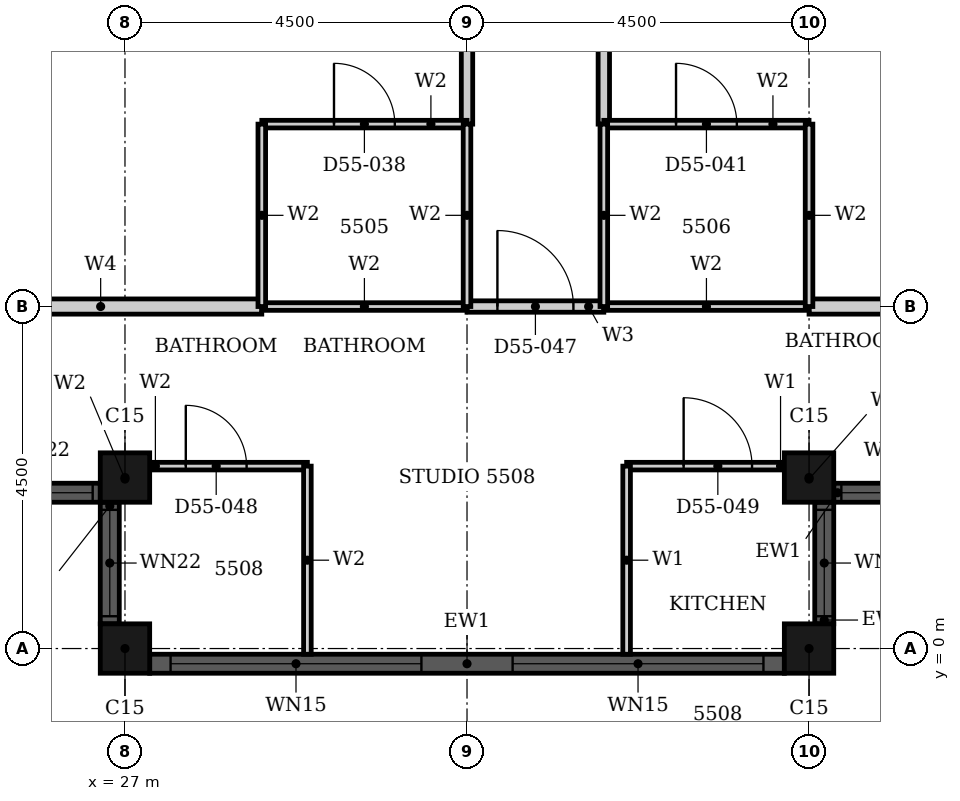
"""IFC4 building model, lengths in metres.
Left out: names, types, materials, properties, quantities, classifications, styles, units other than length and angle.
Written with IfcOpenShell. Run it as: python <this file> out.ifc"""

import sys

from ifc_helpers import new_model, si_unit, direction, frame, frame_2d, origin, origin_2d, place, context, subcontext, project, spatial, rectangle, hollow_rectangle, extrude, element, fill, save


model = new_model("IFC4")
c1 = context("Model", 3, precision=1e-05, world=origin(), true_north=direction((0.0, 1.0)))
c2 = subcontext(c1, "Body", "Model", "MODEL_VIEW")
j1 = project(units=[si_unit("LENGTHUNIT", "METRE"), si_unit("PLANEANGLEUNIT", "RADIAN")], contexts=[c1])
p1 = place(None, origin())
s1 = spatial("IfcSite", under=j1, at=p1, CompositionType="ELEMENT")
p2 = place(p1, origin())
s2 = spatial("IfcBuilding", under=s1, at=p2, CompositionType="ELEMENT")
p3 = place(p2, frame((0.0, 0.0, 218.3)))
s3 = spatial("IfcBuildingStorey", under=s2, at=p3, CompositionType="ELEMENT", Elevation=218.3)
for number, where, z_axis, x_axis in (
    (1, (27.0, 2.25, 0.0), (0.0, 0.0, 1.0), (1.0, 0.0, 0.0)),
    (2, (27.0, 0.0, 0.0), (0.0, 0.0, 1.0), (1.0, 0.0, 0.0)),
    (3, (36.0, 0.0, 0.0), (0.0, 0.0, 1.0), (1.0, 0.0, 0.0)),
    (4, (36.0, 2.25, 0.0), (0.0, 0.0, 1.0), (1.0, 0.0, 0.0)),
):
    element("IfcColumn", number, at=place(p3, frame(where, z_axis=z_axis, x_axis=x_axis)), inside=s3, PredefinedType="COLUMN", context=c2, shape_type="SweptSolid", body=[
        extrude(hollow_rectangle(XDim=0.65, YDim=0.65, WallThickness=0.021, at=origin_2d()), origin(), (0.0, 0.0, 1.0), 3.7),
    ])
p4 = place(p3, frame((25.075, 2.05, 0.0), z_axis=(0.0, 0.0, 1.0), x_axis=(1.0, 0.0, 0.0)))
e5 = element("IfcWall", 5, at=p4, inside=s3, PredefinedType="SOLIDWALL", context=c2, shape_type="SweptSolid", body=[
    extrude(rectangle(XDim=1.6, YDim=0.25, at=frame_2d((0.8, 0.0))), origin(), (0.0, 0.0, 1.0), 3.7),
])
p5 = place(p4, frame((0.1, 0.0, 0.9)))
e6 = element("IfcOpeningElement", 6, at=p5, cuts=e5, PredefinedType="OPENING", context=c2, shape_type="SweptSolid", body=[
    extrude(rectangle(XDim=1.4, YDim=1.85, at=frame_2d((0.7, 0.925))), frame((0.0, 0.135, 0.0), z_axis=(0.0, -1.0, 0.0), x_axis=(1.0, 0.0, 0.0)), (0.0, 0.0, 1.0), 0.27),
])
p6 = place(p3, frame((26.8, 1.925, 0.0), z_axis=(0.0, 0.0, 1.0), x_axis=(0.0, -1.0, 0.0)))
e7 = element("IfcWall", 7, at=p6, inside=s3, PredefinedType="SOLIDWALL", context=c2, shape_type="SweptSolid", body=[
    extrude(rectangle(XDim=1.6, YDim=0.25, at=frame_2d((0.8, 0.0))), origin(), (0.0, 0.0, 1.0), 3.7),
])
p7 = place(p6, frame((0.1, 0.0, 0.9)))
e8 = element("IfcOpeningElement", 8, at=p7, cuts=e7, PredefinedType="OPENING", context=c2, shape_type="SweptSolid", body=[
    extrude(rectangle(XDim=1.4, YDim=1.85, at=frame_2d((0.7, 0.925))), frame((0.0, 0.135, 0.0), z_axis=(0.0, -1.0, 0.0), x_axis=(1.0, 0.0, 0.0)), (0.0, 0.0, 1.0), 0.27),
])
p8 = place(p3, frame((27.325, -0.2, 0.0), z_axis=(0.0, 0.0, 1.0), x_axis=(1.0, 0.0, 0.0)))
e9 = element("IfcWall", 9, at=p8, inside=s3, PredefinedType="SOLIDWALL", context=c2, shape_type="SweptSolid", body=[
    extrude(rectangle(XDim=8.35, YDim=0.25, at=frame_2d((4.175, 0.0))), origin(), (0.0, 0.0, 1.0), 3.7),
])
p9 = place(p8, frame((0.275, 0.0, 0.45)))
e10 = element("IfcOpeningElement", 10, at=p9, cuts=e9, PredefinedType="OPENING", context=c2, shape_type="SweptSolid", body=[
    extrude(rectangle(XDim=3.3, YDim=2.3, at=frame_2d((1.65, 1.15))), frame((0.0, 0.135, 0.0), z_axis=(0.0, -1.0, 0.0), x_axis=(1.0, 0.0, 0.0)), (0.0, 0.0, 1.0), 0.27),
])
p10 = place(p8, frame((4.775, 0.0, 0.45)))
e11 = element("IfcOpeningElement", 11, at=p10, cuts=e9, PredefinedType="OPENING", context=c2, shape_type="SweptSolid", body=[
    extrude(rectangle(XDim=3.3, YDim=2.3, at=frame_2d((1.65, 1.15))), frame((0.0, 0.135, 0.0), z_axis=(0.0, -1.0, 0.0), x_axis=(1.0, 0.0, 0.0)), (0.0, 0.0, 1.0), 0.27),
])
p11 = place(p3, frame((36.2, 0.325, 0.0), z_axis=(0.0, 0.0, 1.0), x_axis=(0.0, 1.0, 0.0)))
e12 = element("IfcWall", 12, at=p11, inside=s3, PredefinedType="SOLIDWALL", context=c2, shape_type="SweptSolid", body=[
    extrude(rectangle(XDim=1.6, YDim=0.25, at=frame_2d((0.8, 0.0))), origin(), (0.0, 0.0, 1.0), 3.7),
])
p12 = place(p11, frame((0.1, 0.0, 0.9)))
e13 = element("IfcOpeningElement", 13, at=p12, cuts=e12, PredefinedType="OPENING", context=c2, shape_type="SweptSolid", body=[
    extrude(rectangle(XDim=1.4, YDim=1.85, at=frame_2d((0.7, 0.925))), frame((0.0, 0.135, 0.0), z_axis=(0.0, -1.0, 0.0), x_axis=(1.0, 0.0, 0.0)), (0.0, 0.0, 1.0), 0.27),
])
p13 = place(p3, frame((36.325, 2.05, 0.0), z_axis=(0.0, 0.0, 1.0), x_axis=(1.0, 0.0, 0.0)))
e14 = element("IfcWall", 14, at=p13, inside=s3, PredefinedType="SOLIDWALL", context=c2, shape_type="SweptSolid", body=[
    extrude(rectangle(XDim=1.6, YDim=0.25, at=frame_2d((0.8, 0.0))), origin(), (0.0, 0.0, 1.0), 3.7),
])
p14 = place(p13, frame((0.1, 0.0, 0.9)))
e15 = element("IfcOpeningElement", 15, at=p14, cuts=e14, PredefinedType="OPENING", context=c2, shape_type="SweptSolid", body=[
    extrude(rectangle(XDim=1.4, YDim=1.85, at=frame_2d((0.7, 0.925))), frame((0.0, 0.135, 0.0), z_axis=(0.0, -1.0, 0.0), x_axis=(1.0, 0.0, 0.0)), (0.0, 0.0, 1.0), 0.27),
])
p15 = place(p3, frame((31.5, 4.5, 0.0), z_axis=(0.0, 0.0, 1.0), x_axis=(1.0, 0.0, 0.0)))
e16 = element("IfcWall", 16, at=p15, inside=s3, PredefinedType="PARTITIONING", context=c2, shape_type="SweptSolid", body=[
    extrude(rectangle(XDim=1.8, YDim=0.15, at=frame_2d((0.9, 0.0))), origin(), (0.0, 0.0, 1.0), 3.4),
])
p16 = place(p15, frame((0.4, 0.0, 0.0)))
e17 = element("IfcOpeningElement", 17, at=p16, cuts=e16, PredefinedType="OPENING", context=c2, shape_type="SweptSolid", body=[
    extrude(rectangle(XDim=1.0, YDim=2.2, at=frame_2d((0.5, 1.1))), frame((0.0, 0.085, 0.0), z_axis=(0.0, -1.0, 0.0), x_axis=(1.0, 0.0, 0.0)), (0.0, 0.0, 1.0), 0.17),
])
p17 = place(p3, frame((31.5, 6.9, 0.0), z_axis=(0.0, 0.0, 1.0), x_axis=(0.0, 1.0, 0.0)))
e18 = element("IfcWall", 18, at=p17, inside=s3, PredefinedType="PARTITIONING", context=c2, shape_type="SweptSolid", body=[
    extrude(rectangle(XDim=13.8, YDim=0.15, at=frame_2d((6.9, 0.0))), origin(), (0.0, 0.0, 1.0), 2.68),
])
p18 = place(p17, frame((1.3, 0.0, 0.0)))
e19 = element("IfcOpeningElement", 19, at=p18, cuts=e18, PredefinedType="OPENING", context=c2, shape_type="SweptSolid", body=[
    extrude(rectangle(XDim=1.0, YDim=2.2, at=frame_2d((0.5, 1.1))), frame((0.0, 0.085, 0.0), z_axis=(0.0, -1.0, 0.0), x_axis=(1.0, 0.0, 0.0)), (0.0, 0.0, 1.0), 0.17),
])
p19 = place(p3, frame((33.3, 6.9, 0.0), z_axis=(0.0, 0.0, 1.0), x_axis=(0.0, 1.0, 0.0)))
e20 = element("IfcWall", 20, at=p19, inside=s3, PredefinedType="PARTITIONING", context=c2, shape_type="SweptSolid", body=[
    extrude(rectangle(XDim=13.799, YDim=0.15, at=frame_2d((6.899, 0.0))), origin(), (0.0, 0.0, 1.0), 3.4),
])
p20 = place(p19, frame((9.699, 0.0, 0.0)))
e21 = element("IfcOpeningElement", 21, at=p20, cuts=e20, PredefinedType="OPENING", context=c2, shape_type="SweptSolid", body=[
    extrude(rectangle(XDim=1.0, YDim=2.2, at=frame_2d((0.5, 1.1))), frame((0.0, 0.085, 0.0), z_axis=(0.0, -1.0, 0.0), x_axis=(1.0, 0.0, 0.0)), (0.0, 0.0, 1.0), 0.17),
])
p21 = place(p19, frame((1.3, 0.0, 0.0)))
e22 = element("IfcOpeningElement", 22, at=p21, cuts=e20, PredefinedType="OPENING", context=c2, shape_type="SweptSolid", body=[
    extrude(rectangle(XDim=1.0, YDim=2.2, at=frame_2d((0.5, 1.1))), frame((0.0, 0.085, 0.0), z_axis=(0.0, -1.0, 0.0), x_axis=(1.0, 0.0, 0.0)), (0.0, 0.0, 1.0), 0.17),
])
p22 = place(p3, frame((33.6, 2.4, 0.0), z_axis=(0.0, 0.0, 1.0), x_axis=(1.0, 0.0, 0.0)))
e23 = element("IfcWall", 23, at=p22, inside=s3, PredefinedType="PARTITIONING", context=c2, shape_type="SweptSolid", body=[
    extrude(rectangle(XDim=2.4, YDim=0.1, at=frame_2d((1.2, 0.0))), origin(), (0.0, 0.0, 1.0), 3.4),
])
p23 = place(p22, frame((0.75, 0.0, 0.0)))
e24 = element("IfcOpeningElement", 24, at=p23, cuts=e23, PredefinedType="OPENING", context=c2, shape_type="SweptSolid", body=[
    extrude(rectangle(XDim=0.9, YDim=2.1, at=frame_2d((0.45, 1.05))), frame((0.0, 0.06, 0.0), z_axis=(0.0, -1.0, 0.0), x_axis=(1.0, 0.0, 0.0)), (0.0, 0.0, 1.0), 0.12),
])
p24 = place(p3, frame((33.6, -0.075, 0.0), z_axis=(0.0, 0.0, 1.0), x_axis=(0.0, 1.0, 0.0)))
e25 = element("IfcWall", 25, at=p24, inside=s3, PredefinedType="PARTITIONING", context=c2, shape_type="SweptSolid", body=[
    extrude(rectangle(XDim=2.475, YDim=0.1, at=frame_2d((1.237, 0.0))), origin(), (0.0, 0.0, 1.0), 3.4),
])
p25 = place(p3, frame((36.0, 2.06, 0.0), z_axis=(0.0, 0.0, 1.0), x_axis=(0.0, 1.0, 0.0)))
e26 = element("IfcWall", 26, at=p25, inside=s3, PredefinedType="PARTITIONING", context=c2, shape_type="SweptSolid", body=[
    extrude(rectangle(XDim=0.34, YDim=0.1, at=frame_2d((0.17, 0.0))), origin(), (0.0, 0.0, 1.0), 3.4),
])
p26 = place(p3, frame((36.0, 4.5, 0.0), z_axis=(0.0, 0.0, 1.0), x_axis=(1.0, 0.0, 0.0)))
e27 = element("IfcWall", 27, at=p26, inside=s3, PredefinedType="PARTITIONING", context=c2, shape_type="SweptSolid", body=[
    extrude(rectangle(XDim=2.44, YDim=0.2, at=frame_2d((1.22, 0.0))), origin(), (0.0, 0.0, 1.0), 3.4),
])
p27 = place(p3, frame((24.56, 4.5, 0.0), z_axis=(0.0, 0.0, 1.0), x_axis=(1.0, 0.0, 0.0)))
e28 = element("IfcWall", 28, at=p27, inside=s3, PredefinedType="PARTITIONING", context=c2, shape_type="SweptSolid", body=[
    extrude(rectangle(XDim=4.24, YDim=0.2, at=frame_2d((2.12, 0.0))), origin(), (0.0, 0.0, 1.0), 3.4),
])
p28 = place(p3, frame((27.0, 2.4, 0.0), z_axis=(0.0, 0.0, 1.0), x_axis=(1.0, 0.0, 0.0)))
e29 = element("IfcWall", 29, at=p28, inside=s3, PredefinedType="PARTITIONING", context=c2, shape_type="SweptSolid", body=[
    extrude(rectangle(XDim=2.4, YDim=0.1, at=frame_2d((1.2, 0.0))), origin(), (0.0, 0.0, 1.0), 3.4),
])
p29 = place(p28, frame((0.8, 0.0, 0.0)))
e30 = element("IfcOpeningElement", 30, at=p29, cuts=e29, PredefinedType="OPENING", context=c2, shape_type="SweptSolid", body=[
    extrude(rectangle(XDim=0.8, YDim=2.1, at=frame_2d((0.4, 1.05))), frame((0.0, 0.06, 0.0), z_axis=(0.0, -1.0, 0.0), x_axis=(1.0, 0.0, 0.0)), (0.0, 0.0, 1.0), 0.12),
])
for number, where, z_axis, x_axis in (
    (31, (33.3, 4.5, 0.0), (0.0, 0.0, 1.0), (1.0, 0.0, 0.0)),
    (32, (28.8, 4.5, 0.0), (0.0, 0.0, 1.0), (1.0, 0.0, 0.0)),
):
    element("IfcWall", number, at=place(p3, frame(where, z_axis=z_axis, x_axis=x_axis)), inside=s3, PredefinedType="PARTITIONING", context=c2, shape_type="SweptSolid", body=[
        extrude(rectangle(XDim=2.7, YDim=0.1, at=frame_2d((1.35, 0.0))), origin(), (0.0, 0.0, 1.0), 3.4),
    ])
p30 = place(p3, frame((33.3, 6.9, 0.0), z_axis=(0.0, 0.0, 1.0), x_axis=(1.0, 0.0, 0.0)))
e33 = element("IfcWall", 33, at=p30, inside=s3, PredefinedType="PARTITIONING", context=c2, shape_type="SweptSolid", body=[
    extrude(rectangle(XDim=2.7, YDim=0.1, at=frame_2d((1.35, 0.0))), origin(), (0.0, 0.0, 1.0), 3.4),
])
p31 = place(p30, frame((0.95, 0.0, 0.0)))
e34 = element("IfcOpeningElement", 34, at=p31, cuts=e33, PredefinedType="OPENING", context=c2, shape_type="SweptSolid", body=[
    extrude(rectangle(XDim=0.8, YDim=2.1, at=frame_2d((0.4, 1.05))), frame((0.0, 0.06, 0.0), z_axis=(0.0, -1.0, 0.0), x_axis=(1.0, 0.0, 0.0)), (0.0, 0.0, 1.0), 0.12),
])
p32 = place(p3, frame((28.8, 6.9, 0.0), z_axis=(0.0, 0.0, 1.0), x_axis=(1.0, 0.0, 0.0)))
e35 = element("IfcWall", 35, at=p32, inside=s3, PredefinedType="PARTITIONING", context=c2, shape_type="SweptSolid", body=[
    extrude(rectangle(XDim=2.7, YDim=0.1, at=frame_2d((1.35, 0.0))), origin(), (0.0, 0.0, 1.0), 3.4),
])
p33 = place(p32, frame((0.95, 0.0, 0.0)))
e36 = element("IfcOpeningElement", 36, at=p33, cuts=e35, PredefinedType="OPENING", context=c2, shape_type="SweptSolid", body=[
    extrude(rectangle(XDim=0.8, YDim=2.1, at=frame_2d((0.4, 1.05))), frame((0.0, 0.06, 0.0), z_axis=(0.0, -1.0, 0.0), x_axis=(1.0, 0.0, 0.0)), (0.0, 0.0, 1.0), 0.12),
])
p34 = place(p3, frame((27.0, 2.06, 0.0), z_axis=(0.0, 0.0, 1.0), x_axis=(0.0, 1.0, 0.0)))
e37 = element("IfcWall", 37, at=p34, inside=s3, PredefinedType="PARTITIONING", context=c2, shape_type="SweptSolid", body=[
    extrude(rectangle(XDim=0.34, YDim=0.1, at=frame_2d((0.17, 0.0))), origin(), (0.0, 0.0, 1.0), 3.4),
])
p35 = place(p3, frame((28.8, 4.5, 0.0), z_axis=(0.0, 0.0, 1.0), x_axis=(0.0, 1.0, 0.0)))
e38 = element("IfcWall", 38, at=p35, inside=s3, PredefinedType="PARTITIONING", context=c2, shape_type="SweptSolid", body=[
    extrude(rectangle(XDim=2.4, YDim=0.1, at=frame_2d((1.2, 0.0))), origin(), (0.0, 0.0, 1.0), 3.4),
])
p36 = place(p3, frame((29.4, -0.075, 0.0), z_axis=(0.0, 0.0, 1.0), x_axis=(0.0, 1.0, 0.0)))
e39 = element("IfcWall", 39, at=p36, inside=s3, PredefinedType="PARTITIONING", context=c2, shape_type="SweptSolid", body=[
    extrude(rectangle(XDim=2.475, YDim=0.1, at=frame_2d((1.237, 0.0))), origin(), (0.0, 0.0, 1.0), 3.4),
])
p37 = place(p3, frame((31.5, 4.5, 0.0), z_axis=(0.0, 0.0, 1.0), x_axis=(0.0, 1.0, 0.0)))
e40 = element("IfcWall", 40, at=p37, inside=s3, PredefinedType="PARTITIONING", context=c2, shape_type="SweptSolid", body=[
    extrude(rectangle(XDim=2.4, YDim=0.1, at=frame_2d((1.2, 0.0))), origin(), (0.0, 0.0, 1.0), 2.68),
])
p38 = place(p3, frame((33.3, 4.5, 0.0), z_axis=(0.0, 0.0, 1.0), x_axis=(0.0, 1.0, 0.0)))
e41 = element("IfcWall", 41, at=p38, inside=s3, PredefinedType="PARTITIONING", context=c2, shape_type="SweptSolid", body=[
    extrude(rectangle(XDim=2.4, YDim=0.1, at=frame_2d((1.2, 0.0))), origin(), (0.0, 0.0, 1.0), 3.4),
])
p39 = place(p3, frame((36.0, 4.5, 0.0), z_axis=(0.0, 0.0, 1.0), x_axis=(0.0, 1.0, 0.0)))
e42 = element("IfcWall", 42, at=p39, inside=s3, PredefinedType="PARTITIONING", context=c2, shape_type="SweptSolid", body=[
    extrude(rectangle(XDim=2.4, YDim=0.1, at=frame_2d((1.2, 0.0))), origin(), (0.0, 0.0, 1.0), 2.68),
])
p40 = place(p5, origin())
e43 = element("IfcWindow", 43, at=p40, inside=s3, PartitioningType="SINGLE_PANEL", PredefinedType="WINDOW", context=c2, shape_type="SweptSolid", body=[
    extrude(rectangle(XDim=1.4, YDim=1.85, at=frame_2d((0.7, 0.925))), frame((0.0, 0.03, 0.0), z_axis=(0.0, -1.0, 0.0), x_axis=(1.0, 0.0, 0.0)), (0.0, 0.0, 1.0), 0.06),
])
fill(e6, e43)
p41 = place(p7, origin())
e44 = element("IfcWindow", 44, at=p41, inside=s3, PartitioningType="SINGLE_PANEL", PredefinedType="WINDOW", context=c2, shape_type="SweptSolid", body=[
    extrude(rectangle(XDim=1.4, YDim=1.85, at=frame_2d((0.7, 0.925))), frame((0.0, 0.03, 0.0), z_axis=(0.0, -1.0, 0.0), x_axis=(1.0, 0.0, 0.0)), (0.0, 0.0, 1.0), 0.06),
])
fill(e8, e44)
p42 = place(p9, origin())
e45 = element("IfcWindow", 45, at=p42, inside=s3, PartitioningType="SINGLE_PANEL", PredefinedType="WINDOW", context=c2, shape_type="SweptSolid", body=[
    extrude(rectangle(XDim=3.3, YDim=2.3, at=frame_2d((1.65, 1.15))), frame((0.0, 0.03, 0.0), z_axis=(0.0, -1.0, 0.0), x_axis=(1.0, 0.0, 0.0)), (0.0, 0.0, 1.0), 0.06),
])
fill(e10, e45)
p43 = place(p10, origin())
e46 = element("IfcWindow", 46, at=p43, inside=s3, PartitioningType="SINGLE_PANEL", PredefinedType="WINDOW", context=c2, shape_type="SweptSolid", body=[
    extrude(rectangle(XDim=3.3, YDim=2.3, at=frame_2d((1.65, 1.15))), frame((0.0, 0.03, 0.0), z_axis=(0.0, -1.0, 0.0), x_axis=(1.0, 0.0, 0.0)), (0.0, 0.0, 1.0), 0.06),
])
fill(e11, e46)
p44 = place(p12, origin())
e47 = element("IfcWindow", 47, at=p44, inside=s3, PartitioningType="SINGLE_PANEL", PredefinedType="WINDOW", context=c2, shape_type="SweptSolid", body=[
    extrude(rectangle(XDim=1.4, YDim=1.85, at=frame_2d((0.7, 0.925))), frame((0.0, 0.03, 0.0), z_axis=(0.0, -1.0, 0.0), x_axis=(1.0, 0.0, 0.0)), (0.0, 0.0, 1.0), 0.06),
])
fill(e13, e47)
p45 = place(p14, origin())
e48 = element("IfcWindow", 48, at=p45, inside=s3, PartitioningType="SINGLE_PANEL", PredefinedType="WINDOW", context=c2, shape_type="SweptSolid", body=[
    extrude(rectangle(XDim=1.4, YDim=1.85, at=frame_2d((0.7, 0.925))), frame((0.0, 0.03, 0.0), z_axis=(0.0, -1.0, 0.0), x_axis=(1.0, 0.0, 0.0)), (0.0, 0.0, 1.0), 0.06),
])
fill(e15, e48)
p46 = place(p33, origin())
e49 = element("IfcDoor", 49, at=p46, inside=s3, OperationType="SINGLE_SWING_LEFT", PredefinedType="DOOR", context=c2, shape_type="SweptSolid", body=[
    extrude(rectangle(XDim=0.8, YDim=2.1, at=frame_2d((0.4, 1.05))), frame((0.0, 0.025, 0.0), z_axis=(0.0, -1.0, 0.0), x_axis=(1.0, 0.0, 0.0)), (0.0, 0.0, 1.0), 0.05),
])
fill(e36, e49)
p47 = place(p31, origin())
e50 = element("IfcDoor", 50, at=p47, inside=s3, OperationType="SINGLE_SWING_RIGHT", PredefinedType="DOOR", context=c2, shape_type="SweptSolid", body=[
    extrude(rectangle(XDim=0.8, YDim=2.1, at=frame_2d((0.4, 1.05))), frame((0.0, 0.025, 0.0), z_axis=(0.0, -1.0, 0.0), x_axis=(1.0, 0.0, 0.0)), (0.0, 0.0, 1.0), 0.05),
])
fill(e34, e50)
p48 = place(p16, origin())
e51 = element("IfcDoor", 51, at=p48, inside=s3, OperationType="SINGLE_SWING_LEFT", PredefinedType="DOOR", context=c2, shape_type="SweptSolid", body=[
    extrude(rectangle(XDim=1.0, YDim=2.2, at=frame_2d((0.5, 1.1))), frame((0.0, 0.025, 0.0), z_axis=(0.0, -1.0, 0.0), x_axis=(1.0, 0.0, 0.0)), (0.0, 0.0, 1.0), 0.05),
])
fill(e17, e51)
p49 = place(p29, origin())
e52 = element("IfcDoor", 52, at=p49, inside=s3, OperationType="SINGLE_SWING_LEFT", PredefinedType="DOOR", context=c2, shape_type="SweptSolid", body=[
    extrude(rectangle(XDim=0.8, YDim=2.1, at=frame_2d((0.4, 1.05))), frame((0.0, 0.025, 0.0), z_axis=(0.0, -1.0, 0.0), x_axis=(1.0, 0.0, 0.0)), (0.0, 0.0, 1.0), 0.05),
])
fill(e30, e52)
p50 = place(p23, origin())
e53 = element("IfcDoor", 53, at=p50, inside=s3, OperationType="SINGLE_SWING_LEFT", PredefinedType="DOOR", context=c2, shape_type="SweptSolid", body=[
    extrude(rectangle(XDim=0.9, YDim=2.1, at=frame_2d((0.45, 1.05))), frame((0.0, 0.025, 0.0), z_axis=(0.0, -1.0, 0.0), x_axis=(1.0, 0.0, 0.0)), (0.0, 0.0, 1.0), 0.05),
])
fill(e24, e53)
save(model, sys.argv[1])
